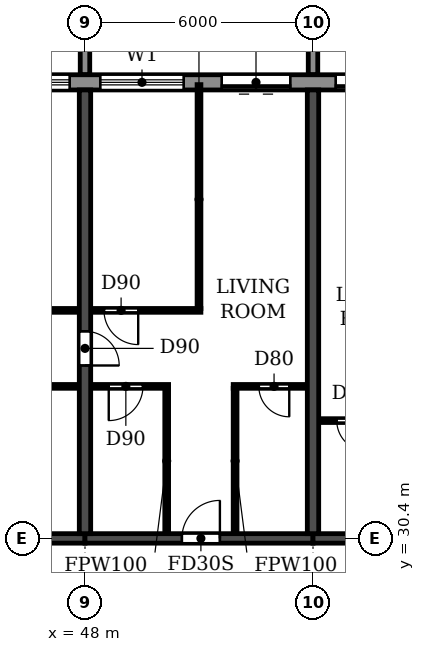
"""IFC4 building model, lengths in metres.
Left out: names, types, materials, properties, quantities, classifications, styles, units other than length and angle.
Written with IfcOpenShell. Run it as: python <this file> out.ifc"""

import sys

from ifc_helpers import new_model, si_unit, direction, frame, frame_2d, origin, place, context, subcontext, project, spatial, polyline, rectangle, outline, extrude, source, transform, mapped, element, fill, save


model = new_model("IFC4")
c1 = context("Model", 3, precision=1e-05, world=origin(), true_north=direction((0.0, 1.0)))
c2 = subcontext(c1, "Body", "Model", "MODEL_VIEW")
j1 = project(units=[si_unit("LENGTHUNIT", "METRE"), si_unit("PLANEANGLEUNIT", "RADIAN")], contexts=[c1])
p1 = place(None, origin())
s1 = spatial("IfcSite", under=j1, at=p1, CompositionType="ELEMENT")
p2 = place(p1, origin())
s2 = spatial("IfcBuilding", under=s1, at=p2, CompositionType="ELEMENT")
p3 = place(p2, frame((0.0, 0.0, 142.2)))
s3 = spatial("IfcBuildingStorey", under=s2, at=p3, CompositionType="ELEMENT", Elevation=142.2)
p4 = place(p3, frame((48.0, 30.525, 0.0), z_axis=(0.0, 0.0, 1.0), x_axis=(0.0, 1.0, 0.0)))
e1 = element("IfcWall", 1, at=p4, inside=s3, PredefinedType="SHEAR", context=c2, shape_type="SweptSolid", body=[
    extrude(rectangle(XDim=11.675, YDim=0.3, at=frame_2d((5.837, 0.0))), origin(), (0.0, 0.0, 1.0), 3.07),
])
p5 = place(p4, frame((4.425, 0.0, 0.0)))
e2 = element("IfcOpeningElement", 2, at=p5, cuts=e1, PredefinedType="OPENING", context=c2, shape_type="SweptSolid", body=[
    extrude(rectangle(XDim=0.9, YDim=2.1, at=frame_2d((0.45, 1.05))), frame((0.0, 0.16, 0.0), z_axis=(0.0, -1.0, 0.0), x_axis=(1.0, 0.0, 0.0)), (0.0, 0.0, 1.0), 0.32),
])
p6 = place(p3, frame((54.0, 30.525, 0.0), z_axis=(0.0, 0.0, 1.0), x_axis=(0.0, 1.0, 0.0)))
e3 = element("IfcWall", 3, at=p6, inside=s3, PredefinedType="SHEAR", context=c2, shape_type="SweptSolid", body=[
    extrude(rectangle(XDim=11.675, YDim=0.3, at=frame_2d((5.837, 0.0))), origin(), (0.0, 0.0, 1.0), 3.07),
])
p7 = place(p3, frame((42.0, 30.4, 0.0), z_axis=(0.0, 0.0, 1.0), x_axis=(1.0, 0.0, 0.0)))
e4 = element("IfcWall", 4, at=p7, inside=s3, PredefinedType="SHEAR", context=c2, shape_type="SweptSolid", body=[
    extrude(rectangle(XDim=6.0, YDim=0.25, at=frame_2d((3.0, 0.0))), origin(), (0.0, 0.0, 1.0), 2.47),
])
p8 = place(p3, frame((48.0, 30.4, 0.0), z_axis=(0.0, 0.0, 1.0), x_axis=(1.0, 0.0, 0.0)))
e5 = element("IfcWall", 5, at=p8, inside=s3, PredefinedType="SHEAR", context=c2, shape_type="SweptSolid", body=[
    extrude(rectangle(XDim=6.0, YDim=0.25, at=frame_2d((3.0, 0.0))), origin(), (0.0, 0.0, 1.0), 2.47),
])
p9 = place(p8, frame((2.55, 0.0, 0.0)))
e6 = element("IfcOpeningElement", 6, at=p9, cuts=e5, PredefinedType="OPENING", context=c2, shape_type="SweptSolid", body=[
    extrude(rectangle(XDim=1.0, YDim=2.1, at=frame_2d((0.5, 1.05))), frame((0.0, 0.135, 0.0), z_axis=(0.0, -1.0, 0.0), x_axis=(1.0, 0.0, 0.0)), (0.0, 0.0, 1.0), 0.27),
])
p10 = place(p3, frame((54.0, 30.4, 0.0), z_axis=(0.0, 0.0, 1.0), x_axis=(1.0, 0.0, 0.0)))
e7 = element("IfcWall", 7, at=p10, inside=s3, PredefinedType="SHEAR", context=c2, shape_type="SweptSolid", body=[
    extrude(rectangle(XDim=6.0, YDim=0.25, at=frame_2d((3.0, 0.0))), origin(), (0.0, 0.0, 1.0), 2.47),
])
p11 = place(p10, frame((2.45, 0.0, 0.0)))
e8 = element("IfcOpeningElement", 8, at=p11, cuts=e7, PredefinedType="OPENING", context=c2, shape_type="SweptSolid", body=[
    extrude(rectangle(XDim=1.0, YDim=2.1, at=frame_2d((0.5, 1.05))), frame((0.0, 0.135, 0.0), z_axis=(0.0, -1.0, 0.0), x_axis=(1.0, 0.0, 0.0)), (0.0, 0.0, 1.0), 0.27),
])
p12 = place(p3, frame((85.317, 42.4, 0.0), z_axis=(0.0, 0.0, 1.0), x_axis=(-1.0, 0.0, 0.0)))
e9 = element("IfcWall", 9, at=p12, inside=s3, PredefinedType="STANDARD", context=c2, shape_type="SweptSolid", body=[
    extrude(rectangle(XDim=68.634, YDim=0.4, at=frame_2d((34.317, 0.0))), origin(), (0.0, 0.0, 1.0), 3.07),
])
p13 = place(p12, frame((64.717, 0.0, 0.9)))
e10 = element("IfcOpeningElement", 10, at=p13, cuts=e9, PredefinedType="OPENING", context=c2, shape_type="SweptSolid", body=[
    extrude(rectangle(XDim=2.2, YDim=1.5, at=frame_2d((1.1, 0.75))), frame((0.0, 0.21, 0.0), z_axis=(0.0, -1.0, 0.0), x_axis=(1.0, 0.0, 0.0)), (0.0, 0.0, 1.0), 0.42),
])
p14 = place(p12, frame((61.917, 0.0, 0.0)))
e11 = element("IfcOpeningElement", 11, at=p14, cuts=e9, PredefinedType="OPENING", context=c2, shape_type="SweptSolid", body=[
    extrude(rectangle(XDim=1.8, YDim=2.4, at=frame_2d((0.9, 1.2))), frame((0.0, 0.21, 0.0), z_axis=(0.0, -1.0, 0.0), x_axis=(1.0, 0.0, 0.0)), (0.0, 0.0, 1.0), 0.42),
])
p15 = place(p12, frame((58.717, 0.0, 0.9)))
e12 = element("IfcOpeningElement", 12, at=p15, cuts=e9, PredefinedType="OPENING", context=c2, shape_type="SweptSolid", body=[
    extrude(rectangle(XDim=2.2, YDim=1.5, at=frame_2d((1.1, 0.75))), frame((0.0, 0.21, 0.0), z_axis=(0.0, -1.0, 0.0), x_axis=(1.0, 0.0, 0.0)), (0.0, 0.0, 1.0), 0.42),
])
p16 = place(p12, frame((55.917, 0.0, 0.0)))
e13 = element("IfcOpeningElement", 13, at=p16, cuts=e9, PredefinedType="OPENING", context=c2, shape_type="SweptSolid", body=[
    extrude(rectangle(XDim=1.8, YDim=2.4, at=frame_2d((0.9, 1.2))), frame((0.0, 0.21, 0.0), z_axis=(0.0, -1.0, 0.0), x_axis=(1.0, 0.0, 0.0)), (0.0, 0.0, 1.0), 0.42),
])
p17 = place(p12, frame((52.717, 0.0, 0.9)))
e14 = element("IfcOpeningElement", 14, at=p17, cuts=e9, PredefinedType="OPENING", context=c2, shape_type="SweptSolid", body=[
    extrude(rectangle(XDim=2.2, YDim=1.5, at=frame_2d((1.1, 0.75))), frame((0.0, 0.21, 0.0), z_axis=(0.0, -1.0, 0.0), x_axis=(1.0, 0.0, 0.0)), (0.0, 0.0, 1.0), 0.42),
])
p18 = place(p12, frame((49.717, 0.0, 0.9)))
e15 = element("IfcOpeningElement", 15, at=p18, cuts=e9, PredefinedType="OPENING", context=c2, shape_type="SweptSolid", body=[
    extrude(rectangle(XDim=2.2, YDim=1.5, at=frame_2d((1.1, 0.75))), frame((0.0, 0.21, 0.0), z_axis=(0.0, -1.0, 0.0), x_axis=(1.0, 0.0, 0.0)), (0.0, 0.0, 1.0), 0.42),
])
p19 = place(p12, frame((46.917, 0.0, 0.0)))
e16 = element("IfcOpeningElement", 16, at=p19, cuts=e9, PredefinedType="OPENING", context=c2, shape_type="SweptSolid", body=[
    extrude(rectangle(XDim=1.8, YDim=2.4, at=frame_2d((0.9, 1.2))), frame((0.0, 0.21, 0.0), z_axis=(0.0, -1.0, 0.0), x_axis=(1.0, 0.0, 0.0)), (0.0, 0.0, 1.0), 0.42),
])
p20 = place(p12, frame((43.717, 0.0, 0.9)))
e17 = element("IfcOpeningElement", 17, at=p20, cuts=e9, PredefinedType="OPENING", context=c2, shape_type="SweptSolid", body=[
    extrude(rectangle(XDim=2.2, YDim=1.5, at=frame_2d((1.1, 0.75))), frame((0.0, 0.21, 0.0), z_axis=(0.0, -1.0, 0.0), x_axis=(1.0, 0.0, 0.0)), (0.0, 0.0, 1.0), 0.42),
])
p21 = place(p12, frame((40.717, 0.0, 0.9)))
e18 = element("IfcOpeningElement", 18, at=p21, cuts=e9, PredefinedType="OPENING", context=c2, shape_type="SweptSolid", body=[
    extrude(rectangle(XDim=2.2, YDim=1.5, at=frame_2d((1.1, 0.75))), frame((0.0, 0.21, 0.0), z_axis=(0.0, -1.0, 0.0), x_axis=(1.0, 0.0, 0.0)), (0.0, 0.0, 1.0), 0.42),
])
p22 = place(p12, frame((37.717, 0.0, 0.9)))
e19 = element("IfcOpeningElement", 19, at=p22, cuts=e9, PredefinedType="OPENING", context=c2, shape_type="SweptSolid", body=[
    extrude(rectangle(XDim=2.2, YDim=1.5, at=frame_2d((1.1, 0.75))), frame((0.0, 0.21, 0.0), z_axis=(0.0, -1.0, 0.0), x_axis=(1.0, 0.0, 0.0)), (0.0, 0.0, 1.0), 0.42),
])
p23 = place(p12, frame((34.717, 0.0, 0.9)))
e20 = element("IfcOpeningElement", 20, at=p23, cuts=e9, PredefinedType="OPENING", context=c2, shape_type="SweptSolid", body=[
    extrude(rectangle(XDim=2.2, YDim=1.5, at=frame_2d((1.1, 0.75))), frame((0.0, 0.21, 0.0), z_axis=(0.0, -1.0, 0.0), x_axis=(1.0, 0.0, 0.0)), (0.0, 0.0, 1.0), 0.42),
])
p24 = place(p12, frame((31.917, 0.0, 0.0)))
e21 = element("IfcOpeningElement", 21, at=p24, cuts=e9, PredefinedType="OPENING", context=c2, shape_type="SweptSolid", body=[
    extrude(rectangle(XDim=1.8, YDim=2.4, at=frame_2d((0.9, 1.2))), frame((0.0, 0.21, 0.0), z_axis=(0.0, -1.0, 0.0), x_axis=(1.0, 0.0, 0.0)), (0.0, 0.0, 1.0), 0.42),
])
p25 = place(p12, frame((28.917, 0.0, 0.0)))
e22 = element("IfcOpeningElement", 22, at=p25, cuts=e9, PredefinedType="OPENING", context=c2, shape_type="SweptSolid", body=[
    extrude(rectangle(XDim=1.8, YDim=2.4, at=frame_2d((0.9, 1.2))), frame((0.0, 0.21, 0.0), z_axis=(0.0, -1.0, 0.0), x_axis=(1.0, 0.0, 0.0)), (0.0, 0.0, 1.0), 0.42),
])
p26 = place(p12, frame((25.717, 0.0, 0.9)))
e23 = element("IfcOpeningElement", 23, at=p26, cuts=e9, PredefinedType="OPENING", context=c2, shape_type="SweptSolid", body=[
    extrude(rectangle(XDim=2.2, YDim=1.5, at=frame_2d((1.1, 0.75))), frame((0.0, 0.21, 0.0), z_axis=(0.0, -1.0, 0.0), x_axis=(1.0, 0.0, 0.0)), (0.0, 0.0, 1.0), 0.42),
])
p27 = place(p12, frame((22.717, 0.0, 0.9)))
e24 = element("IfcOpeningElement", 24, at=p27, cuts=e9, PredefinedType="OPENING", context=c2, shape_type="SweptSolid", body=[
    extrude(rectangle(XDim=2.2, YDim=1.5, at=frame_2d((1.1, 0.75))), frame((0.0, 0.21, 0.0), z_axis=(0.0, -1.0, 0.0), x_axis=(1.0, 0.0, 0.0)), (0.0, 0.0, 1.0), 0.42),
])
p28 = place(p12, frame((19.717, 0.0, 0.9)))
e25 = element("IfcOpeningElement", 25, at=p28, cuts=e9, PredefinedType="OPENING", context=c2, shape_type="SweptSolid", body=[
    extrude(rectangle(XDim=2.2, YDim=1.5, at=frame_2d((1.1, 0.75))), frame((0.0, 0.21, 0.0), z_axis=(0.0, -1.0, 0.0), x_axis=(1.0, 0.0, 0.0)), (0.0, 0.0, 1.0), 0.42),
])
p29 = place(p12, frame((16.717, 0.0, 0.9)))
e26 = element("IfcOpeningElement", 26, at=p29, cuts=e9, PredefinedType="OPENING", context=c2, shape_type="SweptSolid", body=[
    extrude(rectangle(XDim=2.2, YDim=1.5, at=frame_2d((1.1, 0.75))), frame((0.0, 0.21, 0.0), z_axis=(0.0, -1.0, 0.0), x_axis=(1.0, 0.0, 0.0)), (0.0, 0.0, 1.0), 0.42),
])
p30 = place(p12, frame((13.917, 0.0, 0.0)))
e27 = element("IfcOpeningElement", 27, at=p30, cuts=e9, PredefinedType="OPENING", context=c2, shape_type="SweptSolid", body=[
    extrude(rectangle(XDim=1.8, YDim=2.4, at=frame_2d((0.9, 1.2))), frame((0.0, 0.21, 0.0), z_axis=(0.0, -1.0, 0.0), x_axis=(1.0, 0.0, 0.0)), (0.0, 0.0, 1.0), 0.42),
])
p31 = place(p12, frame((10.917, 0.0, 0.0)))
e28 = element("IfcOpeningElement", 28, at=p31, cuts=e9, PredefinedType="OPENING", context=c2, shape_type="SweptSolid", body=[
    extrude(rectangle(XDim=1.8, YDim=2.4, at=frame_2d((0.9, 1.2))), frame((0.0, 0.21, 0.0), z_axis=(0.0, -1.0, 0.0), x_axis=(1.0, 0.0, 0.0)), (0.0, 0.0, 1.0), 0.42),
])
p32 = place(p12, frame((7.717, 0.0, 0.9)))
e29 = element("IfcOpeningElement", 29, at=p32, cuts=e9, PredefinedType="OPENING", context=c2, shape_type="SweptSolid", body=[
    extrude(rectangle(XDim=2.2, YDim=1.5, at=frame_2d((1.1, 0.75))), frame((0.0, 0.21, 0.0), z_axis=(0.0, -1.0, 0.0), x_axis=(1.0, 0.0, 0.0)), (0.0, 0.0, 1.0), 0.42),
])
p33 = place(p12, frame((4.717, 0.0, 0.9)))
e30 = element("IfcOpeningElement", 30, at=p33, cuts=e9, PredefinedType="OPENING", context=c2, shape_type="SweptSolid", body=[
    extrude(rectangle(XDim=2.2, YDim=1.5, at=frame_2d((1.1, 0.75))), frame((0.0, 0.21, 0.0), z_axis=(0.0, -1.0, 0.0), x_axis=(1.0, 0.0, 0.0)), (0.0, 0.0, 1.0), 0.42),
])
p34 = place(p12, frame((1.917, 0.0, 0.0)))
e31 = element("IfcOpeningElement", 31, at=p34, cuts=e9, PredefinedType="OPENING", context=c2, shape_type="SweptSolid", body=[
    extrude(rectangle(XDim=1.8, YDim=2.4, at=frame_2d((0.9, 1.2))), frame((0.0, 0.21, 0.0), z_axis=(0.0, -1.0, 0.0), x_axis=(1.0, 0.0, 0.0)), (0.0, 0.0, 1.0), 0.42),
])
m1 = source(origin(), c2, "Body", "SweptSolid", [
    extrude(outline(polyline([(0.0, 0.0), (0.25, 0.0), (0.25, 3.1), (0.0, 3.1), (0.0, 0.0)])), origin(), (0.0, 0.0, 1.0), 3.1),
])
for number, where in (
    (32, (47.875, 42.6, 0.0)),
    (33, (53.875, 42.6, 0.0)),
):
    element("IfcWall", number, at=place(p3, frame(where)), inside=s3, PredefinedType="STANDARD", context=c2, shape_type="MappedRepresentation", body=[
        mapped(m1, transform((0.0, 0.0, 0.0))),
    ])
p35 = place(p3, frame((54.16, 33.5, 0.0), z_axis=(0.0, 0.0, 1.0), x_axis=(1.0, 0.0, 0.0)))
e34 = element("IfcWall", 34, at=p35, inside=s3, PredefinedType="PARTITIONING", context=c2, shape_type="SweptSolid", body=[
    extrude(rectangle(XDim=1.94, YDim=0.1, at=frame_2d((0.97, 0.0))), origin(), (0.0, 0.0, 1.0), 3.07),
])
p36 = place(p35, frame((0.465, 0.0, 0.0)))
e35 = element("IfcOpeningElement", 35, at=p36, cuts=e34, PredefinedType="OPENING", context=c2, shape_type="SweptSolid", body=[
    extrude(rectangle(XDim=0.8, YDim=2.1, at=frame_2d((0.4, 1.05))), frame((0.0, 0.06, 0.0), z_axis=(0.0, -1.0, 0.0), x_axis=(1.0, 0.0, 0.0)), (0.0, 0.0, 1.0), 0.12),
])
p37 = place(p3, frame((44.9, 34.4, 0.0), z_axis=(0.0, 0.0, 1.0), x_axis=(1.0, 0.0, 0.0)))
e36 = element("IfcWall", 36, at=p37, inside=s3, PredefinedType="PARTITIONING", context=c2, shape_type="SweptSolid", body=[
    extrude(rectangle(XDim=2.94, YDim=0.1, at=frame_2d((1.47, 0.0))), origin(), (0.0, 0.0, 1.0), 3.07),
])
p38 = place(p37, frame((1.2, 0.0, 0.0)))
e37 = element("IfcOpeningElement", 37, at=p38, cuts=e36, PredefinedType="OPENING", context=c2, shape_type="SweptSolid", body=[
    extrude(rectangle(XDim=0.8, YDim=2.1, at=frame_2d((0.4, 1.05))), frame((0.0, 0.06, 0.0), z_axis=(0.0, -1.0, 0.0), x_axis=(1.0, 0.0, 0.0)), (0.0, 0.0, 1.0), 0.12),
])
p39 = place(p3, frame((48.16, 34.4, 0.0), z_axis=(0.0, 0.0, 1.0), x_axis=(1.0, 0.0, 0.0)))
e38 = element("IfcWall", 38, at=p39, inside=s3, PredefinedType="PARTITIONING", context=c2, shape_type="SweptSolid", body=[
    extrude(rectangle(XDim=2.04, YDim=0.1, at=frame_2d((1.02, 0.0))), origin(), (0.0, 0.0, 1.0), 3.07),
])
p40 = place(p39, frame((0.465, 0.0, 0.0)))
e39 = element("IfcOpeningElement", 39, at=p40, cuts=e38, PredefinedType="OPENING", context=c2, shape_type="SweptSolid", body=[
    extrude(rectangle(XDim=0.9, YDim=2.1, at=frame_2d((0.45, 1.05))), frame((0.0, 0.06, 0.0), z_axis=(0.0, -1.0, 0.0), x_axis=(1.0, 0.0, 0.0)), (0.0, 0.0, 1.0), 0.12),
])
p41 = place(p3, frame((51.9, 34.4, 0.0), z_axis=(0.0, 0.0, 1.0), x_axis=(1.0, 0.0, 0.0)))
e40 = element("IfcWall", 40, at=p41, inside=s3, PredefinedType="PARTITIONING", context=c2, shape_type="SweptSolid", body=[
    extrude(rectangle(XDim=1.94, YDim=0.1, at=frame_2d((0.97, 0.0))), origin(), (0.0, 0.0, 1.0), 3.07),
])
p42 = place(p41, frame((0.675, 0.0, 0.0)))
e41 = element("IfcOpeningElement", 41, at=p42, cuts=e40, PredefinedType="OPENING", context=c2, shape_type="SweptSolid", body=[
    extrude(rectangle(XDim=0.8, YDim=2.1, at=frame_2d((0.4, 1.05))), frame((0.0, 0.06, 0.0), z_axis=(0.0, -1.0, 0.0), x_axis=(1.0, 0.0, 0.0)), (0.0, 0.0, 1.0), 0.12),
])
p43 = place(p3, frame((45.1, 36.4, 0.0), z_axis=(0.0, 0.0, 1.0), x_axis=(1.0, 0.0, 0.0)))
e42 = element("IfcWall", 42, at=p43, inside=s3, PredefinedType="PARTITIONING", context=c2, shape_type="SweptSolid", body=[
    extrude(rectangle(XDim=2.74, YDim=0.1, at=frame_2d((1.37, 0.0))), origin(), (0.0, 0.0, 1.0), 3.07),
])
p44 = place(p43, frame((0.4, 0.0, 0.0)))
e43 = element("IfcOpeningElement", 43, at=p44, cuts=e42, PredefinedType="OPENING", context=c2, shape_type="SweptSolid", body=[
    extrude(rectangle(XDim=0.9, YDim=2.1, at=frame_2d((0.45, 1.05))), frame((0.0, 0.06, 0.0), z_axis=(0.0, -1.0, 0.0), x_axis=(1.0, 0.0, 0.0)), (0.0, 0.0, 1.0), 0.12),
])
p45 = place(p3, frame((48.16, 36.4, 0.0), z_axis=(0.0, 0.0, 1.0), x_axis=(1.0, 0.0, 0.0)))
e44 = element("IfcWall", 44, at=p45, inside=s3, PredefinedType="PARTITIONING", context=c2, shape_type="SweptSolid", body=[
    extrude(rectangle(XDim=2.89, YDim=0.1, at=frame_2d((1.445, 0.0))), origin(), (0.0, 0.0, 1.0), 3.07),
])
p46 = place(p45, frame((0.34, 0.0, 0.0)))
e45 = element("IfcOpeningElement", 45, at=p46, cuts=e44, PredefinedType="OPENING", context=c2, shape_type="SweptSolid", body=[
    extrude(rectangle(XDim=0.9, YDim=2.1, at=frame_2d((0.45, 1.05))), frame((0.0, 0.06, 0.0), z_axis=(0.0, -1.0, 0.0), x_axis=(1.0, 0.0, 0.0)), (0.0, 0.0, 1.0), 0.12),
])
p47 = place(p3, frame((50.15, 30.535, 0.0), z_axis=(0.0, 0.0, 1.0), x_axis=(0.0, 1.0, 0.0)))
e46 = element("IfcWall", 46, at=p47, inside=s3, PredefinedType="PARTITIONING", context=c2, shape_type="SweptSolid", body=[
    extrude(rectangle(XDim=3.815, YDim=0.1, at=frame_2d((1.908, 0.0))), origin(), (0.0, 0.0, 1.0), 3.07),
])
p48 = place(p3, frame((51.0, 36.45, 0.0), z_axis=(0.0, 0.0, 1.0), x_axis=(0.0, 1.0, 0.0)))
e47 = element("IfcWall", 47, at=p48, inside=s3, PredefinedType="PARTITIONING", context=c2, shape_type="SweptSolid", body=[
    extrude(rectangle(XDim=5.89, YDim=0.1, at=frame_2d((2.945, 0.0))), origin(), (0.0, 0.0, 1.0), 3.07),
])
p49 = place(p3, frame((51.95, 30.535, 0.0), z_axis=(0.0, 0.0, 1.0), x_axis=(0.0, 1.0, 0.0)))
e48 = element("IfcWall", 48, at=p49, inside=s3, PredefinedType="PARTITIONING", context=c2, shape_type="SweptSolid", body=[
    extrude(rectangle(XDim=3.815, YDim=0.1, at=frame_2d((1.908, 0.0))), origin(), (0.0, 0.0, 1.0), 3.07),
])
p50 = place(p22, origin())
e49 = element("IfcWindow", 49, at=p50, inside=s3, PartitioningType="DOUBLE_PANEL_HORIZONTAL", PredefinedType="WINDOW", context=c2, shape_type="SweptSolid", body=[
    extrude(rectangle(XDim=2.2, YDim=1.5, at=frame_2d((1.1, 0.75))), frame((0.0, 0.03, 0.0), z_axis=(0.0, -1.0, 0.0), x_axis=(1.0, 0.0, 0.0)), (0.0, 0.0, 1.0), 0.06),
])
fill(e19, e49)
p51 = place(p23, origin())
e50 = element("IfcWindow", 50, at=p51, inside=s3, PartitioningType="DOUBLE_PANEL_HORIZONTAL", PredefinedType="WINDOW", context=c2, shape_type="SweptSolid", body=[
    extrude(rectangle(XDim=2.2, YDim=1.5, at=frame_2d((1.1, 0.75))), frame((0.0, 0.03, 0.0), z_axis=(0.0, -1.0, 0.0), x_axis=(1.0, 0.0, 0.0)), (0.0, 0.0, 1.0), 0.06),
])
fill(e20, e50)
p52 = place(p24, origin())
e51 = element("IfcDoor", 51, at=p52, inside=s3, OperationType="DOUBLE_DOOR_SLIDING", PredefinedType="DOOR", context=c2, shape_type="SweptSolid", body=[
    extrude(rectangle(XDim=1.8, YDim=2.4, at=frame_2d((0.9, 1.2))), frame((0.0, 0.025, 0.0), z_axis=(0.0, -1.0, 0.0), x_axis=(1.0, 0.0, 0.0)), (0.0, 0.0, 1.0), 0.05),
])
fill(e21, e51)
p53 = place(p25, origin())
e52 = element("IfcDoor", 52, at=p53, inside=s3, OperationType="DOUBLE_DOOR_SLIDING", PredefinedType="DOOR", context=c2, shape_type="SweptSolid", body=[
    extrude(rectangle(XDim=1.8, YDim=2.4, at=frame_2d((0.9, 1.2))), frame((0.0, 0.025, 0.0), z_axis=(0.0, -1.0, 0.0), x_axis=(1.0, 0.0, 0.0)), (0.0, 0.0, 1.0), 0.05),
])
fill(e22, e52)
p54 = place(p5, frame((0.9, 0.0, 0.0), z_axis=(0.0, 0.0, 1.0), x_axis=(-1.0, 0.0, 0.0)))
e53 = element("IfcDoor", 53, at=p54, inside=s3, OperationType="SINGLE_SWING_RIGHT", PredefinedType="DOOR", context=c2, shape_type="SweptSolid", body=[
    extrude(rectangle(XDim=0.9, YDim=2.1, at=frame_2d((0.45, 1.05))), frame((0.0, 0.025, 0.0), z_axis=(0.0, -1.0, 0.0), x_axis=(1.0, 0.0, 0.0)), (0.0, 0.0, 1.0), 0.05),
])
fill(e2, e53)
p55 = place(p46, frame((0.9, 0.0, 0.0), z_axis=(0.0, 0.0, 1.0), x_axis=(-1.0, 0.0, 0.0)))
e54 = element("IfcDoor", 54, at=p55, inside=s3, OperationType="SINGLE_SWING_LEFT", PredefinedType="DOOR", context=c2, shape_type="SweptSolid", body=[
    extrude(rectangle(XDim=0.9, YDim=2.1, at=frame_2d((0.45, 1.05))), frame((0.0, 0.025, 0.0), z_axis=(0.0, -1.0, 0.0), x_axis=(1.0, 0.0, 0.0)), (0.0, 0.0, 1.0), 0.05),
])
fill(e45, e54)
p56 = place(p40, frame((0.9, 0.0, 0.0), z_axis=(0.0, 0.0, 1.0), x_axis=(-1.0, 0.0, 0.0)))
e55 = element("IfcDoor", 55, at=p56, inside=s3, OperationType="SINGLE_SWING_RIGHT", PredefinedType="DOOR", context=c2, shape_type="SweptSolid", body=[
    extrude(rectangle(XDim=0.9, YDim=2.1, at=frame_2d((0.45, 1.05))), frame((0.0, 0.025, 0.0), z_axis=(0.0, -1.0, 0.0), x_axis=(1.0, 0.0, 0.0)), (0.0, 0.0, 1.0), 0.05),
])
fill(e39, e55)
p57 = place(p9, origin())
e56 = element("IfcDoor", 56, at=p57, inside=s3, OperationType="SINGLE_SWING_RIGHT", PredefinedType="DOOR", context=c2, shape_type="SweptSolid", body=[
    extrude(rectangle(XDim=1.0, YDim=2.1, at=frame_2d((0.5, 1.05))), frame((0.0, 0.025, 0.0), z_axis=(0.0, -1.0, 0.0), x_axis=(1.0, 0.0, 0.0)), (0.0, 0.0, 1.0), 0.05),
])
fill(e6, e56)
p58 = place(p42, frame((0.8, 0.0, 0.0), z_axis=(0.0, 0.0, 1.0), x_axis=(-1.0, 0.0, 0.0)))
e57 = element("IfcDoor", 57, at=p58, inside=s3, OperationType="SINGLE_SWING_LEFT", PredefinedType="DOOR", context=c2, shape_type="SweptSolid", body=[
    extrude(rectangle(XDim=0.8, YDim=2.1, at=frame_2d((0.4, 1.05))), frame((0.0, 0.025, 0.0), z_axis=(0.0, -1.0, 0.0), x_axis=(1.0, 0.0, 0.0)), (0.0, 0.0, 1.0), 0.05),
])
fill(e41, e57)
p59 = place(p36, frame((0.8, 0.0, 0.0), z_axis=(0.0, 0.0, 1.0), x_axis=(-1.0, 0.0, 0.0)))
e58 = element("IfcDoor", 58, at=p59, inside=s3, OperationType="SINGLE_SWING_LEFT", PredefinedType="DOOR", context=c2, shape_type="SweptSolid", body=[
    extrude(rectangle(XDim=0.8, YDim=2.1, at=frame_2d((0.4, 1.05))), frame((0.0, 0.025, 0.0), z_axis=(0.0, -1.0, 0.0), x_axis=(1.0, 0.0, 0.0)), (0.0, 0.0, 1.0), 0.05),
])
fill(e35, e58)
save(model, sys.argv[1])
